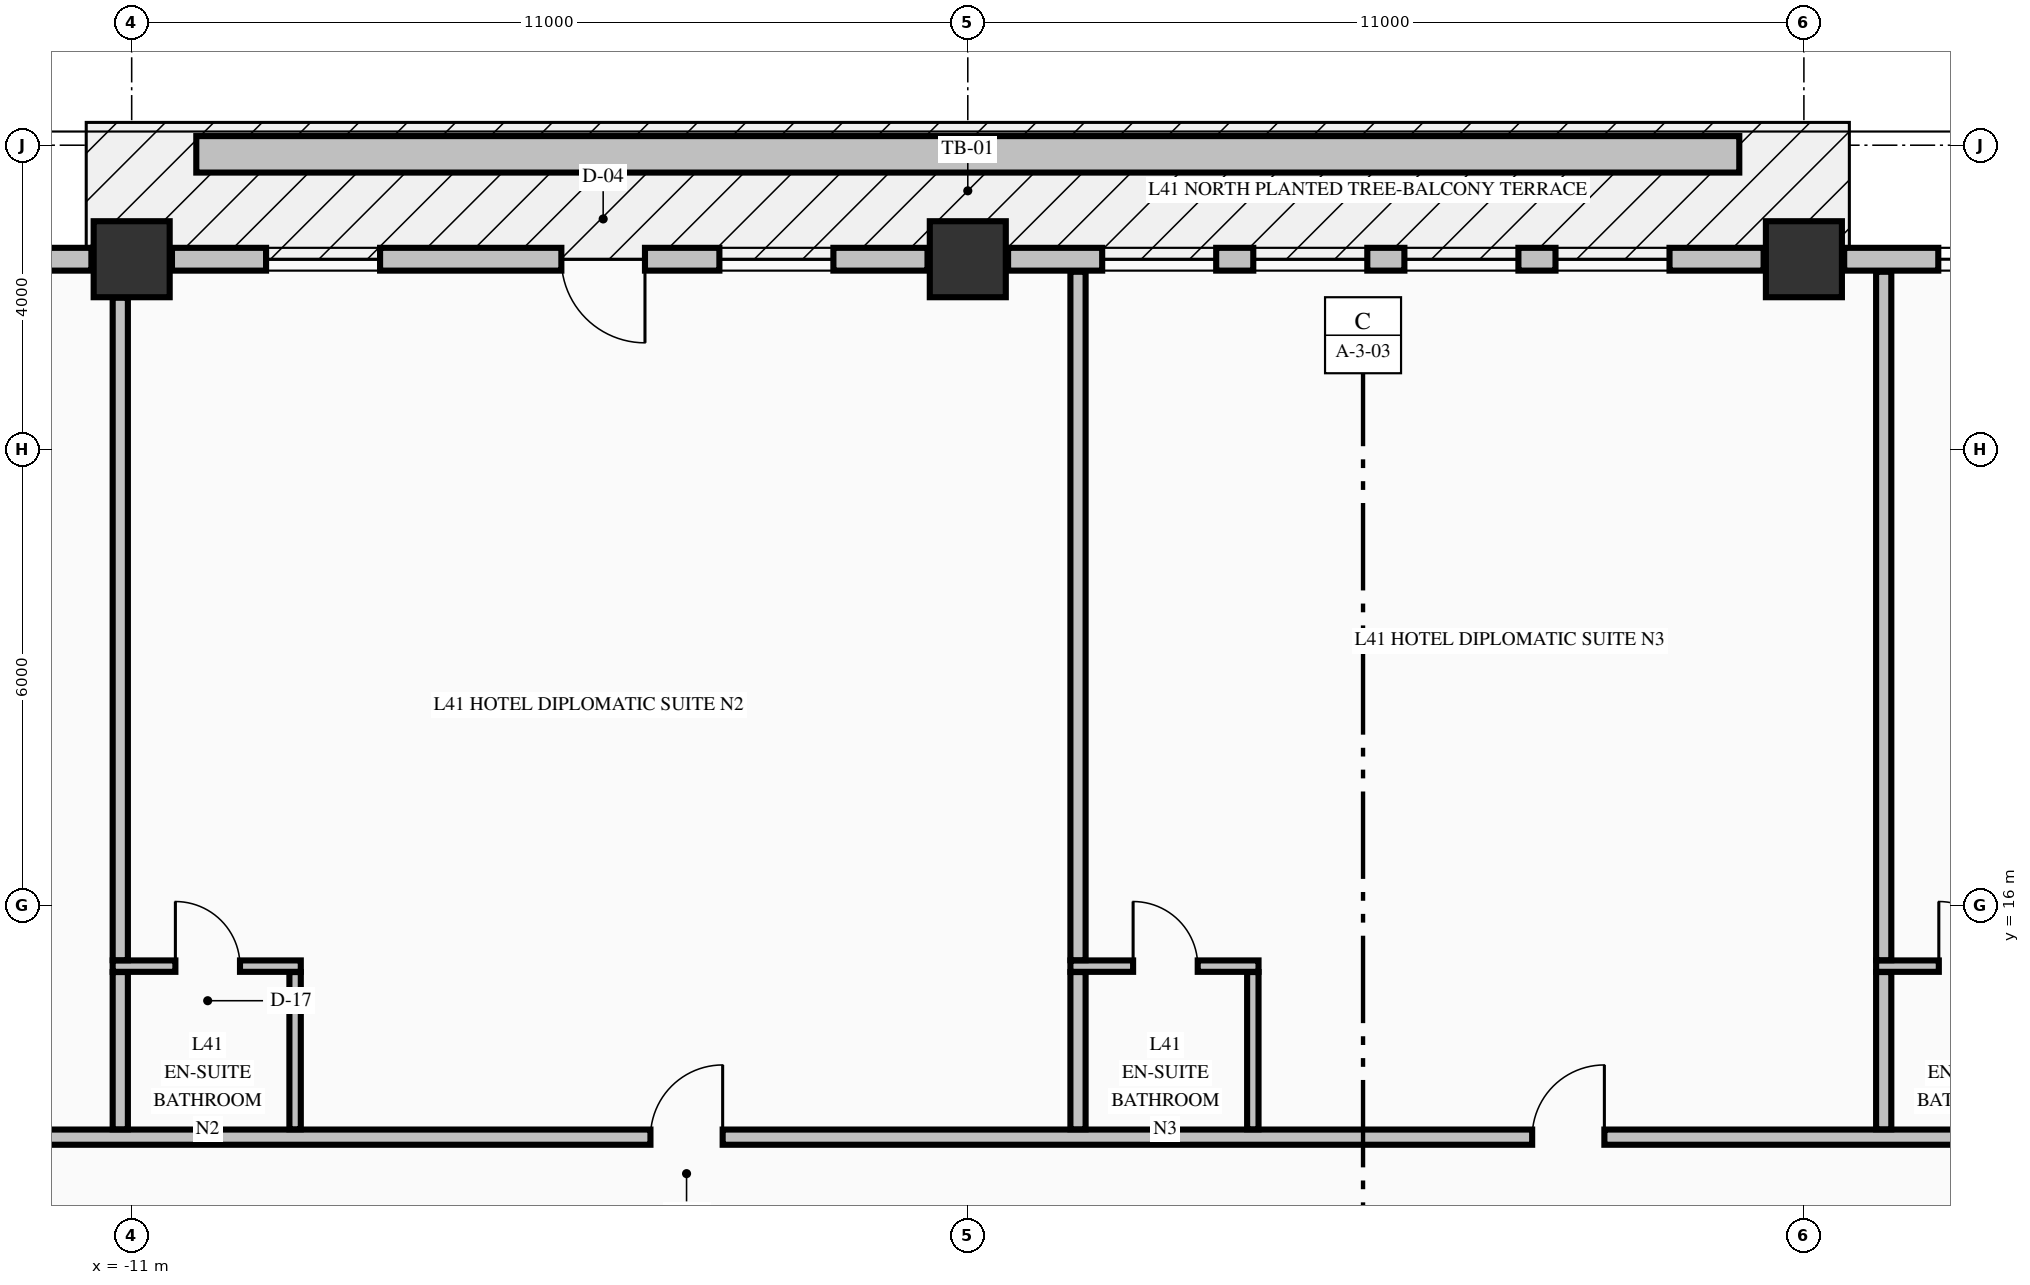
"""IFC4 building model, lengths in metres.
Left out: names, types, materials, properties, quantities, classifications, styles, units other than length and angle.
Written with IfcOpenShell. Run it as: python <this file> out.ifc"""

import sys

from ifc_helpers import new_model, si_unit, direction, frame, frame_2d, origin, origin_2d, place, context, subcontext, project, spatial, rectangle, extrude, element, fill, save


model = new_model("IFC4")
c1 = context("Model", 3, precision=1e-05, world=origin(), true_north=direction((0.0, 1.0)))
c2 = subcontext(c1, "Body", "Model", "MODEL_VIEW")
j1 = project(units=[si_unit("LENGTHUNIT", "METRE"), si_unit("PLANEANGLEUNIT", "RADIAN")], contexts=[c1])
p1 = place(None, origin())
s1 = spatial("IfcSite", under=j1, at=p1, CompositionType="ELEMENT")
p2 = place(p1, origin())
s2 = spatial("IfcBuilding", under=s1, at=p2, CompositionType="ELEMENT")
p3 = place(p2, frame((0.0, 0.0, 162.66)))
s3 = spatial("IfcBuildingStorey", under=s2, at=p3, CompositionType="ELEMENT", Elevation=162.66)
for number, where, z_axis, x_axis in (
    (1, (-11.0, 24.5, -0.25), (0.0, 0.0, 1.0), (1.0, 0.0, 0.0)),
    (2, (0.0, 24.5, -0.25), (0.0, 0.0, 1.0), (1.0, 0.0, 0.0)),
    (3, (11.0, 24.5, -0.25), (0.0, 0.0, 1.0), (1.0, 0.0, 0.0)),
):
    element("IfcColumn", number, at=place(p3, frame(where, z_axis=z_axis, x_axis=x_axis)), inside=s3, PredefinedType="COLUMN", context=c2, shape_type="SweptSolid", body=[
        extrude(rectangle(XDim=1.0, YDim=1.0, at=origin_2d()), origin(), (0.0, 0.0, 1.0), 3.4),
    ])
p4 = place(p3, frame((-11.53, 24.5, 0.0), z_axis=(0.0, 0.0, 1.0), x_axis=(-1.0, 0.0, 0.0)))
e4 = element("IfcWall", 4, at=p4, inside=s3, PredefinedType="STANDARD", context=c2, shape_type="SweptSolid", body=[
    extrude(rectangle(XDim=4.94, YDim=0.3, at=frame_2d((2.47, 0.0))), origin(), (0.0, 0.0, 1.0), 2.542),
])
p5 = place(p4, frame((0.897, 0.0, 0.72)))
e5 = element("IfcOpeningElement", 5, at=p5, cuts=e4, PredefinedType="OPENING", context=c2, shape_type="SweptSolid", body=[
    extrude(rectangle(XDim=1.5, YDim=1.6, at=frame_2d((0.75, 0.8))), frame((0.0, 0.16, 0.0), z_axis=(0.0, -1.0, 0.0), x_axis=(1.0, 0.0, 0.0)), (0.0, 0.0, 1.0), 0.32),
])
p6 = place(p4, frame((2.543, 0.0, 0.72)))
e6 = element("IfcOpeningElement", 6, at=p6, cuts=e4, PredefinedType="OPENING", context=c2, shape_type="SweptSolid", body=[
    extrude(rectangle(XDim=1.5, YDim=1.6, at=frame_2d((0.75, 0.8))), frame((0.0, 0.16, 0.0), z_axis=(0.0, -1.0, 0.0), x_axis=(1.0, 0.0, 0.0)), (0.0, 0.0, 1.0), 0.32),
])
p7 = place(p3, frame((-0.53, 24.5, 0.0), z_axis=(0.0, 0.0, 1.0), x_axis=(-1.0, 0.0, 0.0)))
e7 = element("IfcWall", 7, at=p7, inside=s3, PredefinedType="STANDARD", context=c2, shape_type="SweptSolid", body=[
    extrude(rectangle(XDim=9.94, YDim=0.3, at=frame_2d((4.97, 0.0))), origin(), (0.0, 0.0, 1.0), 2.542),
])
p8 = place(p7, frame((3.717, 0.0, 0.0)))
e8 = element("IfcOpeningElement", 8, at=p8, cuts=e7, PredefinedType="OPENING", context=c2, shape_type="SweptSolid", body=[
    extrude(rectangle(XDim=1.1, YDim=2.15, at=frame_2d((0.55, 1.075))), frame((0.0, 0.16, 0.0), z_axis=(0.0, -1.0, 0.0), x_axis=(1.0, 0.0, 0.0)), (0.0, 0.0, 1.0), 0.32),
])
p9 = place(p7, frame((1.238, 0.0, 0.72)))
e9 = element("IfcOpeningElement", 9, at=p9, cuts=e7, PredefinedType="OPENING", context=c2, shape_type="SweptSolid", body=[
    extrude(rectangle(XDim=1.5, YDim=1.6, at=frame_2d((0.75, 0.8))), frame((0.0, 0.16, 0.0), z_axis=(0.0, -1.0, 0.0), x_axis=(1.0, 0.0, 0.0)), (0.0, 0.0, 1.0), 0.32),
])
p10 = place(p7, frame((7.202, 0.0, 0.72)))
e10 = element("IfcOpeningElement", 10, at=p10, cuts=e7, PredefinedType="OPENING", context=c2, shape_type="SweptSolid", body=[
    extrude(rectangle(XDim=1.5, YDim=1.6, at=frame_2d((0.75, 0.8))), frame((0.0, 0.16, 0.0), z_axis=(0.0, -1.0, 0.0), x_axis=(1.0, 0.0, 0.0)), (0.0, 0.0, 1.0), 0.32),
])
p11 = place(p3, frame((10.47, 24.5, 0.0), z_axis=(0.0, 0.0, 1.0), x_axis=(-1.0, 0.0, 0.0)))
e11 = element("IfcWall", 11, at=p11, inside=s3, PredefinedType="STANDARD", context=c2, shape_type="SweptSolid", body=[
    extrude(rectangle(XDim=9.94, YDim=0.3, at=frame_2d((4.97, 0.0))), origin(), (0.0, 0.0, 1.0), 2.542),
])
p12 = place(p11, frame((1.238, 0.0, 0.72)))
e12 = element("IfcOpeningElement", 12, at=p12, cuts=e11, PredefinedType="OPENING", context=c2, shape_type="SweptSolid", body=[
    extrude(rectangle(XDim=1.5, YDim=1.6, at=frame_2d((0.75, 0.8))), frame((0.0, 0.16, 0.0), z_axis=(0.0, -1.0, 0.0), x_axis=(1.0, 0.0, 0.0)), (0.0, 0.0, 1.0), 0.32),
])
p13 = place(p11, frame((3.226, 0.0, 0.72)))
e13 = element("IfcOpeningElement", 13, at=p13, cuts=e11, PredefinedType="OPENING", context=c2, shape_type="SweptSolid", body=[
    extrude(rectangle(XDim=1.5, YDim=1.6, at=frame_2d((0.75, 0.8))), frame((0.0, 0.16, 0.0), z_axis=(0.0, -1.0, 0.0), x_axis=(1.0, 0.0, 0.0)), (0.0, 0.0, 1.0), 0.32),
])
p14 = place(p11, frame((5.214, 0.0, 0.72)))
e14 = element("IfcOpeningElement", 14, at=p14, cuts=e11, PredefinedType="OPENING", context=c2, shape_type="SweptSolid", body=[
    extrude(rectangle(XDim=1.5, YDim=1.6, at=frame_2d((0.75, 0.8))), frame((0.0, 0.16, 0.0), z_axis=(0.0, -1.0, 0.0), x_axis=(1.0, 0.0, 0.0)), (0.0, 0.0, 1.0), 0.32),
])
p15 = place(p11, frame((7.202, 0.0, 0.72)))
e15 = element("IfcOpeningElement", 15, at=p15, cuts=e11, PredefinedType="OPENING", context=c2, shape_type="SweptSolid", body=[
    extrude(rectangle(XDim=1.5, YDim=1.6, at=frame_2d((0.75, 0.8))), frame((0.0, 0.16, 0.0), z_axis=(0.0, -1.0, 0.0), x_axis=(1.0, 0.0, 0.0)), (0.0, 0.0, 1.0), 0.32),
])
p16 = place(p3, frame((21.47, 24.5, 0.0), z_axis=(0.0, 0.0, 1.0), x_axis=(-1.0, 0.0, 0.0)))
e16 = element("IfcWall", 16, at=p16, inside=s3, PredefinedType="STANDARD", context=c2, shape_type="SweptSolid", body=[
    extrude(rectangle(XDim=9.94, YDim=0.3, at=frame_2d((4.97, 0.0))), origin(), (0.0, 0.0, 1.0), 2.542),
])
p17 = place(p16, frame((3.226, 0.0, 0.72)))
e17 = element("IfcOpeningElement", 17, at=p17, cuts=e16, PredefinedType="OPENING", context=c2, shape_type="SweptSolid", body=[
    extrude(rectangle(XDim=1.5, YDim=1.6, at=frame_2d((0.75, 0.8))), frame((0.0, 0.16, 0.0), z_axis=(0.0, -1.0, 0.0), x_axis=(1.0, 0.0, 0.0)), (0.0, 0.0, 1.0), 0.32),
])
p18 = place(p16, frame((5.214, 0.0, 0.72)))
e18 = element("IfcOpeningElement", 18, at=p18, cuts=e16, PredefinedType="OPENING", context=c2, shape_type="SweptSolid", body=[
    extrude(rectangle(XDim=1.5, YDim=1.6, at=frame_2d((0.75, 0.8))), frame((0.0, 0.16, 0.0), z_axis=(0.0, -1.0, 0.0), x_axis=(1.0, 0.0, 0.0)), (0.0, 0.0, 1.0), 0.32),
])
p19 = place(p16, frame((7.202, 0.0, 0.72)))
e19 = element("IfcOpeningElement", 19, at=p19, cuts=e16, PredefinedType="OPENING", context=c2, shape_type="SweptSolid", body=[
    extrude(rectangle(XDim=1.5, YDim=1.6, at=frame_2d((0.75, 0.8))), frame((0.0, 0.16, 0.0), z_axis=(0.0, -1.0, 0.0), x_axis=(1.0, 0.0, 0.0)), (0.0, 0.0, 1.0), 0.32),
])
p20 = place(p3, frame((-17.1, 12.95, 0.0), z_axis=(0.0, 0.0, 1.0), x_axis=(1.0, 0.0, 0.0)))
e20 = element("IfcWall", 20, at=p20, inside=s3, PredefinedType="PARTITIONING", context=c2, shape_type="SweptSolid", body=[
    extrude(rectangle(XDim=39.2, YDim=0.2, at=frame_2d((19.6, 0.0))), origin(), (0.0, 0.0, 1.0), 3.15),
])
p21 = place(p20, frame((3.695, 0.0, 0.0)))
e21 = element("IfcOpeningElement", 21, at=p21, cuts=e20, PredefinedType="OPENING", context=c2, shape_type="SweptSolid", body=[
    extrude(rectangle(XDim=0.95, YDim=2.15, at=frame_2d((0.475, 1.075))), frame((0.0, 0.11, 0.0), z_axis=(0.0, -1.0, 0.0), x_axis=(1.0, 0.0, 0.0)), (0.0, 0.0, 1.0), 0.22),
])
p22 = place(p20, frame((12.925, 0.0, 0.0)))
e22 = element("IfcOpeningElement", 22, at=p22, cuts=e20, PredefinedType="OPENING", context=c2, shape_type="SweptSolid", body=[
    extrude(rectangle(XDim=0.95, YDim=2.15, at=frame_2d((0.475, 1.075))), frame((0.0, 0.11, 0.0), z_axis=(0.0, -1.0, 0.0), x_axis=(1.0, 0.0, 0.0)), (0.0, 0.0, 1.0), 0.22),
])
p23 = place(p20, frame((24.525, 0.0, 0.0)))
e23 = element("IfcOpeningElement", 23, at=p23, cuts=e20, PredefinedType="OPENING", context=c2, shape_type="SweptSolid", body=[
    extrude(rectangle(XDim=0.95, YDim=2.15, at=frame_2d((0.475, 1.075))), frame((0.0, 0.11, 0.0), z_axis=(0.0, -1.0, 0.0), x_axis=(1.0, 0.0, 0.0)), (0.0, 0.0, 1.0), 0.22),
])
p24 = place(p20, frame((33.695, 0.0, 0.0)))
e24 = element("IfcOpeningElement", 24, at=p24, cuts=e20, PredefinedType="OPENING", context=c2, shape_type="SweptSolid", body=[
    extrude(rectangle(XDim=0.95, YDim=2.15, at=frame_2d((0.475, 1.075))), frame((0.0, 0.11, 0.0), z_axis=(0.0, -1.0, 0.0), x_axis=(1.0, 0.0, 0.0)), (0.0, 0.0, 1.0), 0.22),
])
p25 = place(p3, frame((-11.25, 15.2, 0.0), z_axis=(0.0, 0.0, 1.0), x_axis=(1.0, 0.0, 0.0)))
e25 = element("IfcWall", 25, at=p25, inside=s3, PredefinedType="PARTITIONING", context=c2, shape_type="SweptSolid", body=[
    extrude(rectangle(XDim=2.475, YDim=0.15, at=frame_2d((1.238, 0.0))), origin(), (0.0, 0.0, 1.0), 3.15),
])
p26 = place(p25, frame((0.825, 0.0, 0.0)))
e26 = element("IfcOpeningElement", 26, at=p26, cuts=e25, PredefinedType="OPENING", context=c2, shape_type="SweptSolid", body=[
    extrude(rectangle(XDim=0.85, YDim=2.1, at=frame_2d((0.425, 1.05))), frame((0.0, 0.085, 0.0), z_axis=(0.0, -1.0, 0.0), x_axis=(1.0, 0.0, 0.0)), (0.0, 0.0, 1.0), 0.17),
])
p27 = place(p3, frame((1.35, 15.2, 0.0), z_axis=(0.0, 0.0, 1.0), x_axis=(1.0, 0.0, 0.0)))
e27 = element("IfcWall", 27, at=p27, inside=s3, PredefinedType="PARTITIONING", context=c2, shape_type="SweptSolid", body=[
    extrude(rectangle(XDim=2.475, YDim=0.15, at=frame_2d((1.237, 0.0))), origin(), (0.0, 0.0, 1.0), 3.15),
])
p28 = place(p27, frame((0.825, 0.0, 0.0)))
e28 = element("IfcOpeningElement", 28, at=p28, cuts=e27, PredefinedType="OPENING", context=c2, shape_type="SweptSolid", body=[
    extrude(rectangle(XDim=0.85, YDim=2.1, at=frame_2d((0.425, 1.05))), frame((0.0, 0.085, 0.0), z_axis=(0.0, -1.0, 0.0), x_axis=(1.0, 0.0, 0.0)), (0.0, 0.0, 1.0), 0.17),
])
p29 = place(p3, frame((11.95, 15.2, 0.0), z_axis=(0.0, 0.0, 1.0), x_axis=(1.0, 0.0, 0.0)))
e29 = element("IfcWall", 29, at=p29, inside=s3, PredefinedType="PARTITIONING", context=c2, shape_type="SweptSolid", body=[
    extrude(rectangle(XDim=2.475, YDim=0.15, at=frame_2d((1.238, 0.0))), origin(), (0.0, 0.0, 1.0), 3.15),
])
p30 = place(p29, frame((0.825, 0.0, 0.0)))
e30 = element("IfcOpeningElement", 30, at=p30, cuts=e29, PredefinedType="OPENING", context=c2, shape_type="SweptSolid", body=[
    extrude(rectangle(XDim=0.85, YDim=2.1, at=frame_2d((0.425, 1.05))), frame((0.0, 0.085, 0.0), z_axis=(0.0, -1.0, 0.0), x_axis=(1.0, 0.0, 0.0)), (0.0, 0.0, 1.0), 0.17),
])
p31 = place(p3, frame((-11.15, 13.053, 0.0), z_axis=(0.0, 0.0, 1.0), x_axis=(0.0, 1.0, 0.0)))
e31 = element("IfcWall", 31, at=p31, inside=s3, PredefinedType="PARTITIONING", context=c2, shape_type="SweptSolid", body=[
    extrude(rectangle(XDim=2.069, YDim=0.2, at=frame_2d((1.035, 0.0))), origin(), (0.0, 0.0, 1.0), 2.342),
])
p32 = place(p3, frame((-11.15, 15.278, 0.0), z_axis=(0.0, 0.0, 1.0), x_axis=(0.0, 1.0, 0.0)))
e32 = element("IfcWall", 32, at=p32, inside=s3, PredefinedType="PARTITIONING", context=c2, shape_type="SweptSolid", body=[
    extrude(rectangle(XDim=8.716, YDim=0.2, at=frame_2d((4.358, 0.0))), origin(), (0.0, 0.0, 1.0), 2.342),
])
p33 = place(p3, frame((-8.85, 13.053, 0.0), z_axis=(0.0, 0.0, 1.0), x_axis=(0.0, 1.0, 0.0)))
e33 = element("IfcWall", 33, at=p33, inside=s3, PredefinedType="PARTITIONING", context=c2, shape_type="SweptSolid", body=[
    extrude(rectangle(XDim=2.069, YDim=0.15, at=frame_2d((1.035, 0.0))), origin(), (0.0, 0.0, 1.0), 3.15),
])
p34 = place(p3, frame((1.45, 13.053, 0.0), z_axis=(0.0, 0.0, 1.0), x_axis=(0.0, 1.0, 0.0)))
e34 = element("IfcWall", 34, at=p34, inside=s3, PredefinedType="PARTITIONING", context=c2, shape_type="SweptSolid", body=[
    extrude(rectangle(XDim=2.069, YDim=0.2, at=frame_2d((1.035, 0.0))), origin(), (0.0, 0.0, 1.0), 3.15),
])
p35 = place(p3, frame((1.45, 15.278, 0.0), z_axis=(0.0, 0.0, 1.0), x_axis=(0.0, 1.0, 0.0)))
e35 = element("IfcWall", 35, at=p35, inside=s3, PredefinedType="PARTITIONING", context=c2, shape_type="SweptSolid", body=[
    extrude(rectangle(XDim=9.057, YDim=0.2, at=frame_2d((4.528, 0.0))), origin(), (0.0, 0.0, 1.0), 3.15),
])
p36 = place(p3, frame((3.75, 13.053, 0.0), z_axis=(0.0, 0.0, 1.0), x_axis=(0.0, 1.0, 0.0)))
e36 = element("IfcWall", 36, at=p36, inside=s3, PredefinedType="PARTITIONING", context=c2, shape_type="SweptSolid", body=[
    extrude(rectangle(XDim=2.069, YDim=0.15, at=frame_2d((1.035, 0.0))), origin(), (0.0, 0.0, 1.0), 3.15),
])
p37 = place(p3, frame((12.05, 13.053, 0.0), z_axis=(0.0, 0.0, 1.0), x_axis=(0.0, 1.0, 0.0)))
e37 = element("IfcWall", 37, at=p37, inside=s3, PredefinedType="PARTITIONING", context=c2, shape_type="SweptSolid", body=[
    extrude(rectangle(XDim=2.069, YDim=0.2, at=frame_2d((1.035, 0.0))), origin(), (0.0, 0.0, 1.0), 3.15),
])
p38 = place(p3, frame((12.05, 15.278, 0.0), z_axis=(0.0, 0.0, 1.0), x_axis=(0.0, 1.0, 0.0)))
e38 = element("IfcWall", 38, at=p38, inside=s3, PredefinedType="PARTITIONING", context=c2, shape_type="SweptSolid", body=[
    extrude(rectangle(XDim=9.057, YDim=0.2, at=frame_2d((4.528, 0.0))), origin(), (0.0, 0.0, 1.0), 3.15),
])
p39 = place(p3, frame((-10.15, 25.88, -0.04), z_axis=(0.0, 0.0, 1.0), x_axis=(1.0, 0.0, 0.0)))
e39 = element("IfcWall", 39, at=p39, inside=s3, PredefinedType="PARAPET", context=c2, shape_type="SweptSolid", body=[
    extrude(rectangle(XDim=20.3, YDim=0.48, at=frame_2d((10.15, 0.0))), origin(), (0.0, 0.0, 1.0), 0.52),
])
p40 = place(p8, origin())
e40 = element("IfcDoor", 40, at=p40, inside=s3, OperationType="SINGLE_SWING_LEFT", PredefinedType="DOOR", context=c2, shape_type="SweptSolid", body=[
    extrude(rectangle(XDim=1.1, YDim=2.15, at=frame_2d((0.55, 1.075))), frame((0.0, 0.025, 0.0), z_axis=(0.0, -1.0, 0.0), x_axis=(1.0, 0.0, 0.0)), (0.0, 0.0, 1.0), 0.05),
])
fill(e8, e40)
p41 = place(p9, origin())
e41 = element("IfcWindow", 41, at=p41, inside=s3, PartitioningType="SINGLE_PANEL", PredefinedType="WINDOW", context=c2, shape_type="SweptSolid", body=[
    extrude(rectangle(XDim=1.5, YDim=1.6, at=frame_2d((0.75, 0.8))), frame((0.0, 0.03, 0.0), z_axis=(0.0, -1.0, 0.0), x_axis=(1.0, 0.0, 0.0)), (0.0, 0.0, 1.0), 0.06),
])
fill(e9, e41)
p42 = place(p10, origin())
e42 = element("IfcWindow", 42, at=p42, inside=s3, PartitioningType="SINGLE_PANEL", PredefinedType="WINDOW", context=c2, shape_type="SweptSolid", body=[
    extrude(rectangle(XDim=1.5, YDim=1.6, at=frame_2d((0.75, 0.8))), frame((0.0, 0.03, 0.0), z_axis=(0.0, -1.0, 0.0), x_axis=(1.0, 0.0, 0.0)), (0.0, 0.0, 1.0), 0.06),
])
fill(e10, e42)
p43 = place(p12, origin())
e43 = element("IfcWindow", 43, at=p43, inside=s3, PartitioningType="SINGLE_PANEL", PredefinedType="WINDOW", context=c2, shape_type="SweptSolid", body=[
    extrude(rectangle(XDim=1.5, YDim=1.6, at=frame_2d((0.75, 0.8))), frame((0.0, 0.03, 0.0), z_axis=(0.0, -1.0, 0.0), x_axis=(1.0, 0.0, 0.0)), (0.0, 0.0, 1.0), 0.06),
])
fill(e12, e43)
p44 = place(p13, origin())
e44 = element("IfcWindow", 44, at=p44, inside=s3, PartitioningType="SINGLE_PANEL", PredefinedType="WINDOW", context=c2, shape_type="SweptSolid", body=[
    extrude(rectangle(XDim=1.5, YDim=1.6, at=frame_2d((0.75, 0.8))), frame((0.0, 0.03, 0.0), z_axis=(0.0, -1.0, 0.0), x_axis=(1.0, 0.0, 0.0)), (0.0, 0.0, 1.0), 0.06),
])
fill(e13, e44)
p45 = place(p14, origin())
e45 = element("IfcWindow", 45, at=p45, inside=s3, PartitioningType="SINGLE_PANEL", PredefinedType="WINDOW", context=c2, shape_type="SweptSolid", body=[
    extrude(rectangle(XDim=1.5, YDim=1.6, at=frame_2d((0.75, 0.8))), frame((0.0, 0.03, 0.0), z_axis=(0.0, -1.0, 0.0), x_axis=(1.0, 0.0, 0.0)), (0.0, 0.0, 1.0), 0.06),
])
fill(e14, e45)
p46 = place(p15, origin())
e46 = element("IfcWindow", 46, at=p46, inside=s3, PartitioningType="SINGLE_PANEL", PredefinedType="WINDOW", context=c2, shape_type="SweptSolid", body=[
    extrude(rectangle(XDim=1.5, YDim=1.6, at=frame_2d((0.75, 0.8))), frame((0.0, 0.03, 0.0), z_axis=(0.0, -1.0, 0.0), x_axis=(1.0, 0.0, 0.0)), (0.0, 0.0, 1.0), 0.06),
])
fill(e15, e46)
p47 = place(p19, origin())
e47 = element("IfcWindow", 47, at=p47, inside=s3, PartitioningType="SINGLE_PANEL", PredefinedType="WINDOW", context=c2, shape_type="SweptSolid", body=[
    extrude(rectangle(XDim=1.5, YDim=1.6, at=frame_2d((0.75, 0.8))), frame((0.0, 0.03, 0.0), z_axis=(0.0, -1.0, 0.0), x_axis=(1.0, 0.0, 0.0)), (0.0, 0.0, 1.0), 0.06),
])
fill(e19, e47)
p48 = place(p22, origin())
e48 = element("IfcDoor", 48, at=p48, inside=s3, OperationType="SINGLE_SWING_RIGHT", PredefinedType="DOOR", context=c2, shape_type="SweptSolid", body=[
    extrude(rectangle(XDim=0.95, YDim=2.15, at=frame_2d((0.475, 1.075))), frame((0.0, 0.025, 0.0), z_axis=(0.0, -1.0, 0.0), x_axis=(1.0, 0.0, 0.0)), (0.0, 0.0, 1.0), 0.05),
])
fill(e22, e48)
p49 = place(p26, origin())
e49 = element("IfcDoor", 49, at=p49, inside=s3, OperationType="SINGLE_SWING_LEFT", PredefinedType="DOOR", context=c2, shape_type="SweptSolid", body=[
    extrude(rectangle(XDim=0.85, YDim=2.1, at=frame_2d((0.425, 1.05))), frame((0.0, 0.025, 0.0), z_axis=(0.0, -1.0, 0.0), x_axis=(1.0, 0.0, 0.0)), (0.0, 0.0, 1.0), 0.05),
])
fill(e26, e49)
p50 = place(p23, origin())
e50 = element("IfcDoor", 50, at=p50, inside=s3, OperationType="SINGLE_SWING_RIGHT", PredefinedType="DOOR", context=c2, shape_type="SweptSolid", body=[
    extrude(rectangle(XDim=0.95, YDim=2.15, at=frame_2d((0.475, 1.075))), frame((0.0, 0.025, 0.0), z_axis=(0.0, -1.0, 0.0), x_axis=(1.0, 0.0, 0.0)), (0.0, 0.0, 1.0), 0.05),
])
fill(e23, e50)
p51 = place(p28, origin())
e51 = element("IfcDoor", 51, at=p51, inside=s3, OperationType="SINGLE_SWING_LEFT", PredefinedType="DOOR", context=c2, shape_type="SweptSolid", body=[
    extrude(rectangle(XDim=0.85, YDim=2.1, at=frame_2d((0.425, 1.05))), frame((0.0, 0.025, 0.0), z_axis=(0.0, -1.0, 0.0), x_axis=(1.0, 0.0, 0.0)), (0.0, 0.0, 1.0), 0.05),
])
fill(e28, e51)
p52 = place(p30, origin())
e52 = element("IfcDoor", 52, at=p52, inside=s3, OperationType="SINGLE_SWING_LEFT", PredefinedType="DOOR", context=c2, shape_type="SweptSolid", body=[
    extrude(rectangle(XDim=0.85, YDim=2.1, at=frame_2d((0.425, 1.05))), frame((0.0, 0.025, 0.0), z_axis=(0.0, -1.0, 0.0), x_axis=(1.0, 0.0, 0.0)), (0.0, 0.0, 1.0), 0.05),
])
fill(e30, e52)
save(model, sys.argv[1])
